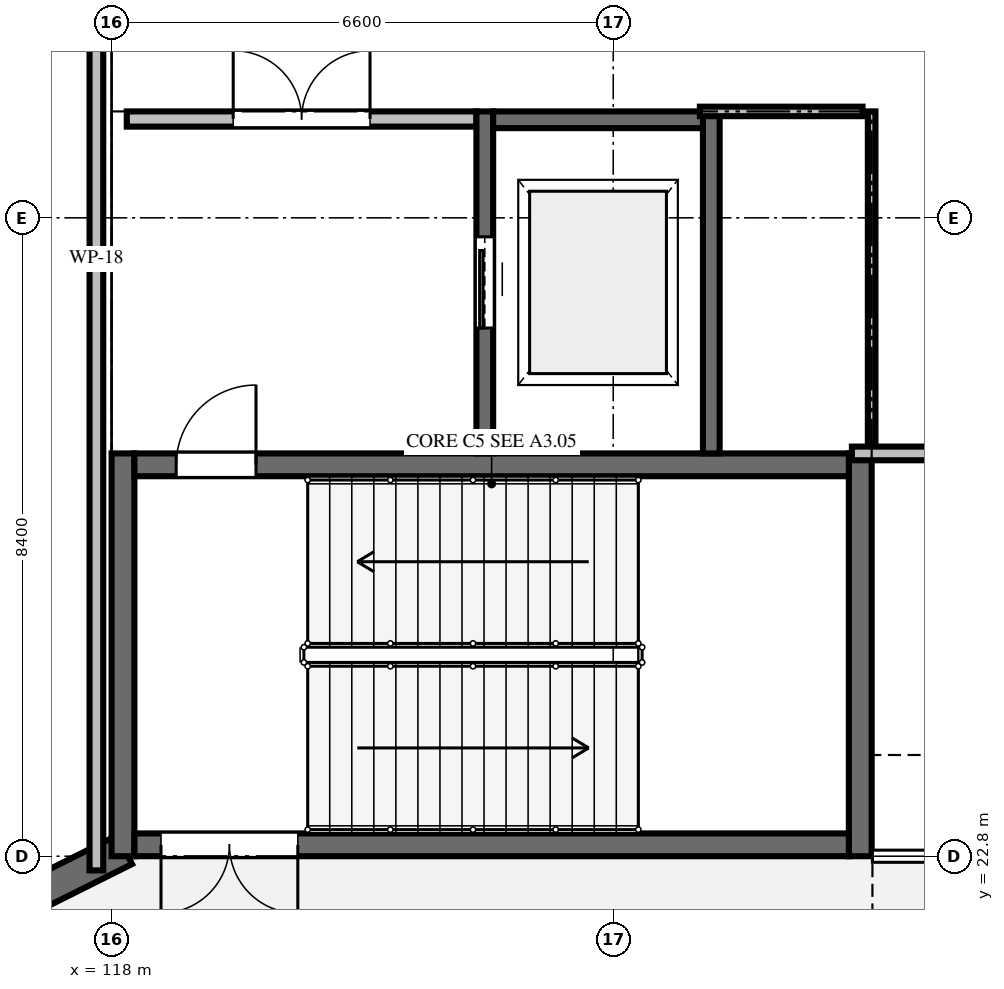
"""IFC4 building model, lengths in metres.
Left out: names, types, materials, properties, quantities, classifications, styles, units other than length and angle.
Written with IfcOpenShell. Run it as: python <this file> out.ifc"""

import sys

from ifc_helpers import new_model, si_unit, direction, frame, frame_2d, origin, place, context, subcontext, project, spatial, rectangle, extrude, element, fill, save


model = new_model("IFC4")
c1 = context("Model", 3, precision=1e-05, world=origin(), true_north=direction((0.0, 1.0)))
c2 = subcontext(c1, "Body", "Model", "MODEL_VIEW")
j1 = project(units=[si_unit("LENGTHUNIT", "METRE"), si_unit("PLANEANGLEUNIT", "RADIAN")], contexts=[c1])
p1 = place(None, origin())
s1 = spatial("IfcSite", under=j1, at=p1, CompositionType="ELEMENT")
p2 = place(p1, origin())
s2 = spatial("IfcBuilding", under=s1, at=p2, CompositionType="ELEMENT")
p3 = place(p2, origin())
s3 = spatial("IfcBuildingStorey", under=s2, at=p3, CompositionType="ELEMENT", Elevation=0.0)
p4 = place(p3, frame((118.174, 22.887, 0.0), z_axis=(0.0, 0.0, 1.0), x_axis=(-0.894432417412, -0.447203142524, 0.0)))
e1 = element("IfcWall", 1, at=p4, inside=s3, PredefinedType="SOLIDWALL", context=c2, shape_type="SweptSolid", body=[
    extrude(rectangle(XDim=9.343, YDim=0.425, at=frame_2d((4.671, 0.0))), origin(), (0.0, 0.0, 1.0), 5.1),
])
p5 = place(p4, frame((3.671, 0.0, 0.0)))
e2 = element("IfcOpeningElement", 2, at=p5, cuts=e1, PredefinedType="OPENING", context=c2, shape_type="SweptSolid", body=[
    extrude(rectangle(XDim=2.0, YDim=2.3, at=frame_2d((1.0, 1.15))), frame((0.0, 0.222, 0.0), z_axis=(0.0, -1.0, 0.0), x_axis=(1.0, 0.0, 0.0)), (0.0, 0.0, 1.0), 0.445),
])
for number, where, z_axis, x_axis in (
    (3, (118.15, 22.8, 0.0), (0.0, 0.0, 1.0), (0.0, 1.0, 0.0)),
    (4, (127.85, 28.1, 0.0), (0.0, 0.0, 1.0), (0.0, -1.0, 0.0)),
):
    element("IfcWall", number, at=place(p3, frame(where, z_axis=z_axis, x_axis=x_axis)), inside=s3, PredefinedType="SHEAR", context=c2, shape_type="SweptSolid", body=[
        extrude(rectangle(XDim=5.3, YDim=0.3, at=frame_2d((2.65, 0.0))), origin(), (0.0, 0.0, 1.0), 5.17),
    ])
p6 = place(p3, frame((127.7, 22.95, 0.0), z_axis=(0.0, 0.0, 1.0), x_axis=(-1.0, 0.0, 0.0)))
e5 = element("IfcWall", 5, at=p6, inside=s3, PredefinedType="SHEAR", context=c2, shape_type="SweptSolid", body=[
    extrude(rectangle(XDim=9.4, YDim=0.3, at=frame_2d((4.7, 0.0))), origin(), (0.0, 0.0, 1.0), 5.17),
])
p7 = place(p6, frame((7.25, 0.0, 0.0)))
e6 = element("IfcOpeningElement", 6, at=p7, cuts=e5, PredefinedType="OPENING", context=c2, shape_type="SweptSolid", body=[
    extrude(rectangle(XDim=1.8, YDim=2.25, at=frame_2d((0.9, 1.125))), frame((0.0, 0.16, 0.0), z_axis=(0.0, -1.0, 0.0), x_axis=(1.0, 0.0, 0.0)), (0.0, 0.0, 1.0), 0.32),
])
p8 = place(p3, frame((118.3, 27.95, 0.0), z_axis=(0.0, 0.0, 1.0), x_axis=(1.0, 0.0, 0.0)))
e7 = element("IfcWall", 7, at=p8, inside=s3, PredefinedType="SHEAR", context=c2, shape_type="SweptSolid", body=[
    extrude(rectangle(XDim=9.4, YDim=0.3, at=frame_2d((4.7, 0.0))), origin(), (0.0, 0.0, 1.0), 5.17),
])
p9 = place(p8, frame((0.55, 0.0, 0.0)))
e8 = element("IfcOpeningElement", 8, at=p9, cuts=e7, PredefinedType="OPENING", context=c2, shape_type="SweptSolid", body=[
    extrude(rectangle(XDim=1.05, YDim=2.2, at=frame_2d((0.525, 1.1))), frame((0.0, 0.16, 0.0), z_axis=(0.0, -1.0, 0.0), x_axis=(1.0, 0.0, 0.0)), (0.0, 0.0, 1.0), 0.32),
])
p10 = place(p3, frame((118.2, 32.5, 0.0), z_axis=(0.0, 0.0, 1.0), x_axis=(1.0, 0.0, 0.0)))
e9 = element("IfcWall", 9, at=p10, inside=s3, PredefinedType="SOLIDWALL", context=c2, shape_type="SweptSolid", body=[
    extrude(rectangle(XDim=4.6, YDim=0.2, at=frame_2d((2.3, 0.0))), origin(), (0.0, 0.0, 1.0), 4.572),
])
p11 = place(p10, frame((1.4, 0.0, 0.0)))
e10 = element("IfcOpeningElement", 10, at=p11, cuts=e9, PredefinedType="OPENING", context=c2, shape_type="SweptSolid", body=[
    extrude(rectangle(XDim=1.8, YDim=2.2, at=frame_2d((0.9, 1.1))), frame((0.0, 0.11, 0.0), z_axis=(0.0, -1.0, 0.0), x_axis=(1.0, 0.0, 0.0)), (0.0, 0.0, 1.0), 0.22),
])
p12 = place(p3, frame((122.91, 28.1, 0.0), z_axis=(0.0, 0.0, 1.0), x_axis=(0.0, 1.0, 0.0)))
e11 = element("IfcWall", 11, at=p12, inside=s3, PredefinedType="SOLIDWALL", context=c2, shape_type="SweptSolid", body=[
    extrude(rectangle(XDim=4.5, YDim=0.22, at=frame_2d((2.25, 0.0))), origin(), (0.0, 0.0, 1.0), 5.17),
])
p13 = place(p12, frame((1.65, 0.0, 0.0)))
e12 = element("IfcOpeningElement", 12, at=p13, cuts=e11, PredefinedType="OPENING", context=c2, shape_type="SweptSolid", body=[
    extrude(rectangle(XDim=1.2, YDim=2.2, at=frame_2d((0.6, 1.1))), frame((0.0, 0.12, 0.0), z_axis=(0.0, -1.0, 0.0), x_axis=(1.0, 0.0, 0.0)), (0.0, 0.0, 1.0), 0.24),
])
p14 = place(p3, frame((125.89, 28.1, 0.0), z_axis=(0.0, 0.0, 1.0), x_axis=(0.0, 1.0, 0.0)))
e13 = element("IfcWall", 13, at=p14, inside=s3, PredefinedType="SOLIDWALL", context=c2, shape_type="SweptSolid", body=[
    extrude(rectangle(XDim=4.5, YDim=0.22, at=frame_2d((2.25, 0.0))), origin(), (0.0, 0.0, 1.0), 5.17),
])
p15 = place(p3, frame((123.02, 32.49, 0.0), z_axis=(0.0, 0.0, 1.0), x_axis=(1.0, 0.0, 0.0)))
e14 = element("IfcWall", 14, at=p15, inside=s3, PredefinedType="SOLIDWALL", context=c2, shape_type="SweptSolid", body=[
    extrude(rectangle(XDim=2.76, YDim=0.22, at=frame_2d((1.38, 0.0))), origin(), (0.0, 0.0, 1.0), 5.17),
])
p16 = place(p3, frame((117.8, 51.368, 0.0), z_axis=(0.0, 0.0, 1.0), x_axis=(0.0, -1.0, 0.0)))
e15 = element("IfcWall", 15, at=p16, inside=s3, PredefinedType="PARTITIONING", context=c2, shape_type="SweptSolid", body=[
    extrude(rectangle(XDim=28.755, YDim=0.18, at=frame_2d((14.377, 0.0))), origin(), (0.0, 0.0, 1.0), 4.278),
])
p17 = place(p16, frame((13.577, 0.0, 0.0)))
e16 = element("IfcOpeningElement", 16, at=p17, cuts=e15, PredefinedType="OPENING", context=c2, shape_type="SweptSolid", body=[
    extrude(rectangle(XDim=1.6, YDim=2.2, at=frame_2d((0.8, 1.1))), frame((0.0, 0.1, 0.0), z_axis=(0.0, -1.0, 0.0), x_axis=(1.0, 0.0, 0.0)), (0.0, 0.0, 1.0), 0.2),
])
p18 = place(p3, frame((131.5, 28.1, 0.0), z_axis=(0.0, 0.0, 1.0), x_axis=(-1.0, 0.0, 0.0)))
e17 = element("IfcWall", 17, at=p18, inside=s3, PredefinedType="PARTITIONING", context=c2, shape_type="SweptSolid", body=[
    extrude(rectangle(XDim=3.76, YDim=0.18, at=frame_2d((1.88, 0.0))), origin(), (0.0, 0.0, 1.0), 4.482),
])
p19 = place(p3, frame((128.0, 28.22, 0.0), z_axis=(0.0, 0.0, 1.0), x_axis=(0.0, 1.0, 0.0)))
e18 = element("IfcWall", 18, at=p19, inside=s3, PredefinedType="PARTITIONING", context=c2, shape_type="SweptSolid", body=[
    extrude(rectangle(XDim=4.38, YDim=0.1, at=frame_2d((2.19, 0.0))), origin(), (0.0, 0.0, 1.0), 5.05),
])
p20 = place(p3, frame((127.88, 32.6, 0.0), z_axis=(0.0, 0.0, 1.0), x_axis=(-1.0, 0.0, 0.0)))
e19 = element("IfcWall", 19, at=p20, inside=s3, PredefinedType="PARTITIONING", context=c2, shape_type="SweptSolid", body=[
    extrude(rectangle(XDim=2.14, YDim=0.125, at=frame_2d((1.07, 0.0))), origin(), (0.0, 0.0, 1.0), 5.05),
])
p21 = place(p7, origin())
e20 = element("IfcDoor", 20, at=p21, inside=s3, OperationType="DOUBLE_DOOR_SINGLE_SWING", PredefinedType="DOOR", context=c2, shape_type="SweptSolid", body=[
    extrude(rectangle(XDim=1.8, YDim=2.25, at=frame_2d((0.9, 1.125))), frame((0.0, 0.025, 0.0), z_axis=(0.0, -1.0, 0.0), x_axis=(1.0, 0.0, 0.0)), (0.0, 0.0, 1.0), 0.05),
])
fill(e6, e20)
p22 = place(p9, origin())
e21 = element("IfcDoor", 21, at=p22, inside=s3, OperationType="SINGLE_SWING_RIGHT", PredefinedType="DOOR", context=c2, shape_type="SweptSolid", body=[
    extrude(rectangle(XDim=1.05, YDim=2.2, at=frame_2d((0.525, 1.1))), frame((0.0, 0.025, 0.0), z_axis=(0.0, -1.0, 0.0), x_axis=(1.0, 0.0, 0.0)), (0.0, 0.0, 1.0), 0.05),
])
fill(e8, e21)
p23 = place(p11, origin())
e22 = element("IfcDoor", 22, at=p23, inside=s3, OperationType="DOUBLE_DOOR_SINGLE_SWING", PredefinedType="DOOR", context=c2, shape_type="SweptSolid", body=[
    extrude(rectangle(XDim=1.8, YDim=2.2, at=frame_2d((0.9, 1.1))), frame((0.0, 0.025, 0.0), z_axis=(0.0, -1.0, 0.0), x_axis=(1.0, 0.0, 0.0)), (0.0, 0.0, 1.0), 0.05),
])
fill(e10, e22)
p24 = place(p13, origin())
e23 = element("IfcDoor", 23, at=p24, inside=s3, OperationType="SLIDING_TO_LEFT", PredefinedType="DOOR", context=c2, shape_type="SweptSolid", body=[
    extrude(rectangle(XDim=1.2, YDim=2.2, at=frame_2d((0.6, 1.1))), frame((0.0, 0.025, 0.0), z_axis=(0.0, -1.0, 0.0), x_axis=(1.0, 0.0, 0.0)), (0.0, 0.0, 1.0), 0.05),
])
fill(e12, e23)
save(model, sys.argv[1])
